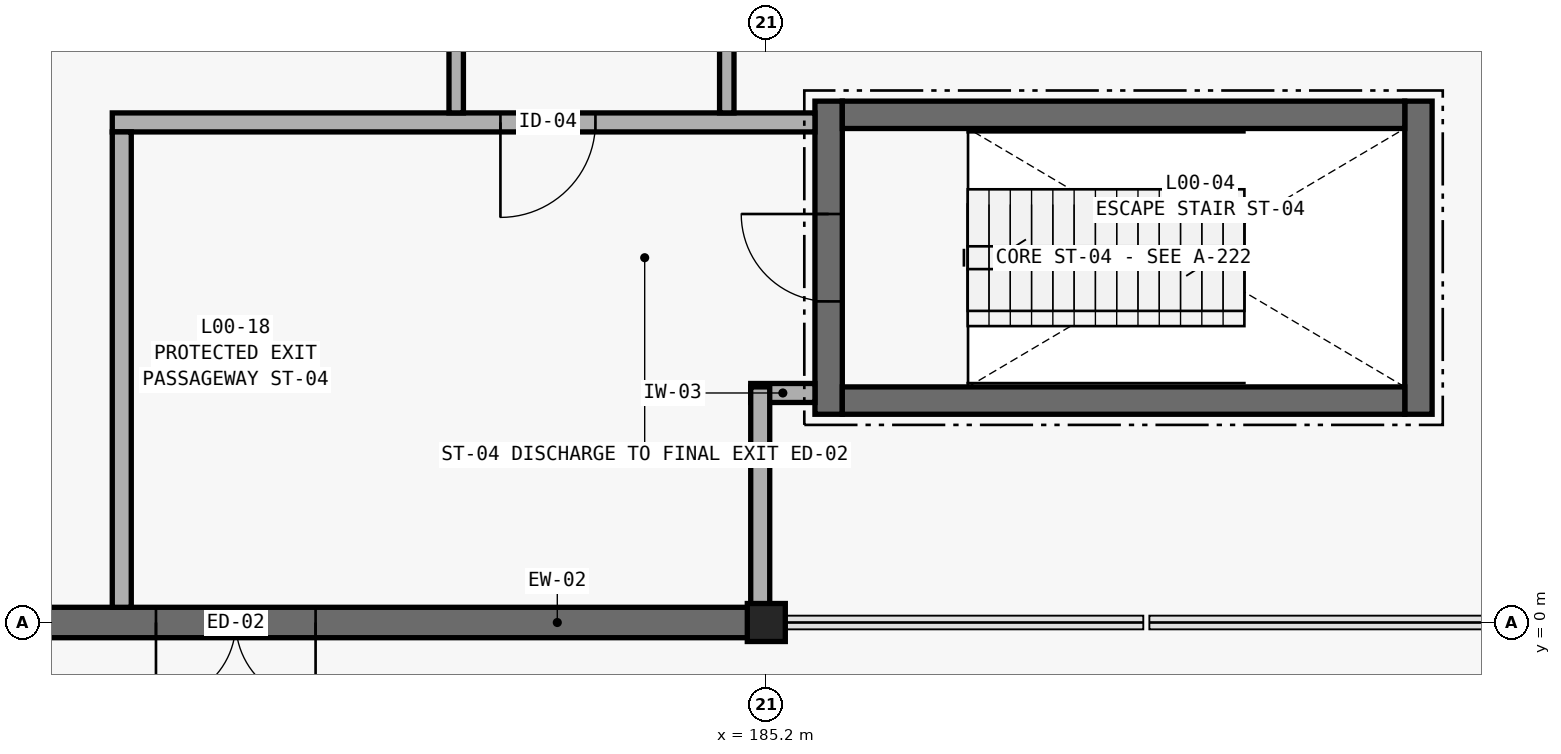
"""IFC4 building model, lengths in metres.
Left out: names, types, materials, properties, quantities, classifications, styles, units other than length and angle.
Written with IfcOpenShell. Run it as: python <this file> out.ifc"""

import sys

from ifc_helpers import new_model, si_unit, direction, frame, frame_2d, origin, origin_2d, place, context, subcontext, project, spatial, rectangle, extrude, element, fill, save


model = new_model("IFC4")
c1 = context("Model", 3, precision=1e-05, world=origin(), true_north=direction((0.0, 1.0)))
c2 = subcontext(c1, "Body", "Model", "MODEL_VIEW")
j1 = project(units=[si_unit("LENGTHUNIT", "METRE"), si_unit("PLANEANGLEUNIT", "RADIAN")], contexts=[c1])
p1 = place(None, origin())
s1 = spatial("IfcSite", under=j1, at=p1, CompositionType="ELEMENT")
p2 = place(p1, origin())
s2 = spatial("IfcBuilding", under=s1, at=p2, CompositionType="ELEMENT")
p3 = place(p2, origin())
s3 = spatial("IfcBuildingStorey", under=s2, at=p3, CompositionType="ELEMENT", Elevation=0.0)
p4 = place(p3, frame((185.2, 0.0, 0.0), z_axis=(0.0, 0.0, 1.0), x_axis=(1.0, 0.0, 0.0)))
e1 = element("IfcColumn", 1, at=p4, inside=s3, PredefinedType="COLUMN", context=c2, shape_type="SweptSolid", body=[
    extrude(rectangle(XDim=0.5, YDim=0.5, at=origin_2d()), origin(), (0.0, 0.0, 1.0), 4.8),
])
p5 = place(p3, frame((175.02, 0.0, 0.0), z_axis=(0.0, 0.0, 1.0), x_axis=(1.0, 0.0, 0.0)))
e2 = element("IfcWall", 2, at=p5, inside=s3, PredefinedType="STANDARD", context=c2, shape_type="SweptSolid", body=[
    extrude(rectangle(XDim=10.36, YDim=0.4, at=frame_2d((5.18, 0.0))), origin(), (0.0, 0.0, 1.0), 4.5),
])
p6 = place(p5, frame((2.15, 0.0, 0.0)))
e3 = element("IfcOpeningElement", 3, at=p6, cuts=e2, PredefinedType="OPENING", context=c2, shape_type="SweptSolid", body=[
    extrude(rectangle(XDim=2.1, YDim=2.6, at=frame_2d((1.05, 1.3))), frame((0.0, 0.215, 0.0), z_axis=(0.0, -1.0, 0.0), x_axis=(1.0, 0.0, 0.0)), (0.0, 0.0, 1.0), 0.43),
])
p7 = place(p3, frame((186.02, 2.74, 0.0), z_axis=(0.0, 0.0, 1.0), x_axis=(0.0, 1.0, 0.0)))
e4 = element("IfcWall", 4, at=p7, inside=s3, PredefinedType="SHEAR", context=c2, shape_type="SweptSolid", body=[
    extrude(rectangle(XDim=4.12, YDim=0.36, at=frame_2d((2.06, 0.0))), origin(), (0.0, 0.0, 1.0), 4.5),
])
p8 = place(p7, frame((1.485, 0.0, 0.0)))
e5 = element("IfcOpeningElement", 5, at=p8, cuts=e4, PredefinedType="OPENING", context=c2, shape_type="SweptSolid", body=[
    extrude(rectangle(XDim=1.15, YDim=2.15, at=frame_2d((0.575, 1.075))), frame((0.0, 0.195, 0.0), z_axis=(0.0, -1.0, 0.0), x_axis=(1.0, 0.0, 0.0)), (0.0, 0.0, 1.0), 0.39),
])
p9 = place(p3, frame((193.78, 2.74, 0.0), z_axis=(0.0, 0.0, 1.0), x_axis=(0.0, 1.0, 0.0)))
e6 = element("IfcWall", 6, at=p9, inside=s3, PredefinedType="SHEAR", context=c2, shape_type="SweptSolid", body=[
    extrude(rectangle(XDim=4.12, YDim=0.36, at=frame_2d((2.06, 0.0))), origin(), (0.0, 0.0, 1.0), 4.5),
])
for number, where, z_axis, x_axis in (
    (7, (186.2, 6.68, 0.0), (0.0, 0.0, 1.0), (1.0, 0.0, 0.0)),
    (8, (186.2, 2.92, 0.0), (0.0, 0.0, 1.0), (1.0, 0.0, 0.0)),
):
    element("IfcWall", number, at=place(p3, frame(where, z_axis=z_axis, x_axis=x_axis)), inside=s3, PredefinedType="SHEAR", context=c2, shape_type="SweptSolid", body=[
        extrude(rectangle(XDim=7.4, YDim=0.36, at=frame_2d((3.7, 0.0))), origin(), (0.0, 0.0, 1.0), 4.5),
    ])
p10 = place(p3, frame((184.995, 3.02, 0.0), z_axis=(0.0, 0.0, 1.0), x_axis=(1.0, 0.0, 0.0)))
e9 = element("IfcWall", 9, at=p10, inside=s3, PredefinedType="PARTITIONING", context=c2, shape_type="SweptSolid", body=[
    extrude(rectangle(XDim=0.845, YDim=0.25, at=frame_2d((0.422, 0.0))), origin(), (0.0, 0.0, 1.0), 3.38),
])
p11 = place(p3, frame((176.595, 6.58, 0.0), z_axis=(0.0, 0.0, 1.0), x_axis=(1.0, 0.0, 0.0)))
e10 = element("IfcWall", 10, at=p11, inside=s3, PredefinedType="PARTITIONING", context=c2, shape_type="SweptSolid", body=[
    extrude(rectangle(XDim=9.245, YDim=0.25, at=frame_2d((4.623, 0.0))), origin(), (0.0, 0.0, 1.0), 3.38),
])
p12 = place(p11, frame((5.107, 0.0, 0.0)))
e11 = element("IfcOpeningElement", 11, at=p12, cuts=e10, PredefinedType="OPENING", context=c2, shape_type="SweptSolid", body=[
    extrude(rectangle(XDim=1.25, YDim=2.15, at=frame_2d((0.625, 1.075))), frame((0.0, 0.14, 0.0), z_axis=(0.0, -1.0, 0.0), x_axis=(1.0, 0.0, 0.0)), (0.0, 0.0, 1.0), 0.28),
])
p13 = place(p3, frame((176.72, 0.2, 0.0), z_axis=(0.0, 0.0, 1.0), x_axis=(0.0, 1.0, 0.0)))
e12 = element("IfcWall", 12, at=p13, inside=s3, PredefinedType="PARTITIONING", context=c2, shape_type="SweptSolid", body=[
    extrude(rectangle(XDim=6.255, YDim=0.25, at=frame_2d((3.127, 0.0))), origin(), (0.0, 0.0, 1.0), 3.38),
])
p14 = place(p3, frame((181.12, 6.705, 0.0), z_axis=(0.0, 0.0, 1.0), x_axis=(0.0, 1.0, 0.0)))
e13 = element("IfcWall", 13, at=p14, inside=s3, PredefinedType="PARTITIONING", context=c2, shape_type="SweptSolid", body=[
    extrude(rectangle(XDim=6.68, YDim=0.19, at=frame_2d((3.34, 0.0))), origin(), (0.0, 0.0, 1.0), 3.38),
])
p15 = place(p14, frame((2.24, 0.0, 0.0)))
e14 = element("IfcOpeningElement", 14, at=p15, cuts=e13, PredefinedType="OPENING", context=c2, shape_type="SweptSolid", body=[
    extrude(rectangle(XDim=2.2, YDim=2.45, at=frame_2d((1.1, 1.225))), frame((0.0, 0.11, 0.0), z_axis=(0.0, -1.0, 0.0), x_axis=(1.0, 0.0, 0.0)), (0.0, 0.0, 1.0), 0.22),
])
p16 = place(p3, frame((184.68, 6.705, 0.0), z_axis=(0.0, 0.0, 1.0), x_axis=(0.0, 1.0, 0.0)))
e15 = element("IfcWall", 15, at=p16, inside=s3, PredefinedType="PARTITIONING", context=c2, shape_type="SweptSolid", body=[
    extrude(rectangle(XDim=2.395, YDim=0.19, at=frame_2d((1.198, 0.0))), origin(), (0.0, 0.0, 1.0), 3.38),
])
p17 = place(p3, frame((185.12, 0.2, 0.0), z_axis=(0.0, 0.0, 1.0), x_axis=(0.0, 1.0, 0.0)))
e16 = element("IfcWall", 16, at=p17, inside=s3, PredefinedType="PARTITIONING", context=c2, shape_type="SweptSolid", body=[
    extrude(rectangle(XDim=2.9, YDim=0.25, at=frame_2d((1.45, 0.0))), origin(), (0.0, 0.0, 1.0), 3.38),
])
p18 = place(p6, frame((2.1, 0.0, 0.0), z_axis=(0.0, 0.0, 1.0), x_axis=(-1.0, 0.0, 0.0)))
e17 = element("IfcDoor", 17, at=p18, inside=s3, OperationType="DOUBLE_DOOR_SINGLE_SWING", PredefinedType="DOOR", context=c2, shape_type="SweptSolid", body=[
    extrude(rectangle(XDim=2.1, YDim=2.6, at=frame_2d((1.05, 1.3))), frame((0.0, 0.025, 0.0), z_axis=(0.0, -1.0, 0.0), x_axis=(1.0, 0.0, 0.0)), (0.0, 0.0, 1.0), 0.05),
])
fill(e3, e17)
p19 = place(p8, origin())
e18 = element("IfcDoor", 18, at=p19, inside=s3, OperationType="SINGLE_SWING_RIGHT", PredefinedType="DOOR", context=c2, shape_type="SweptSolid", body=[
    extrude(rectangle(XDim=1.15, YDim=2.15, at=frame_2d((0.575, 1.075))), frame((0.0, 0.025, 0.0), z_axis=(0.0, -1.0, 0.0), x_axis=(1.0, 0.0, 0.0)), (0.0, 0.0, 1.0), 0.05),
])
fill(e5, e18)
p20 = place(p12, frame((1.25, 0.0, 0.0), z_axis=(0.0, 0.0, 1.0), x_axis=(-1.0, 0.0, 0.0)))
e19 = element("IfcDoor", 19, at=p20, inside=s3, OperationType="SINGLE_SWING_LEFT", PredefinedType="DOOR", context=c2, shape_type="SweptSolid", body=[
    extrude(rectangle(XDim=1.25, YDim=2.15, at=frame_2d((0.625, 1.075))), frame((0.0, 0.025, 0.0), z_axis=(0.0, -1.0, 0.0), x_axis=(1.0, 0.0, 0.0)), (0.0, 0.0, 1.0), 0.05),
])
fill(e11, e19)
save(model, sys.argv[1])
